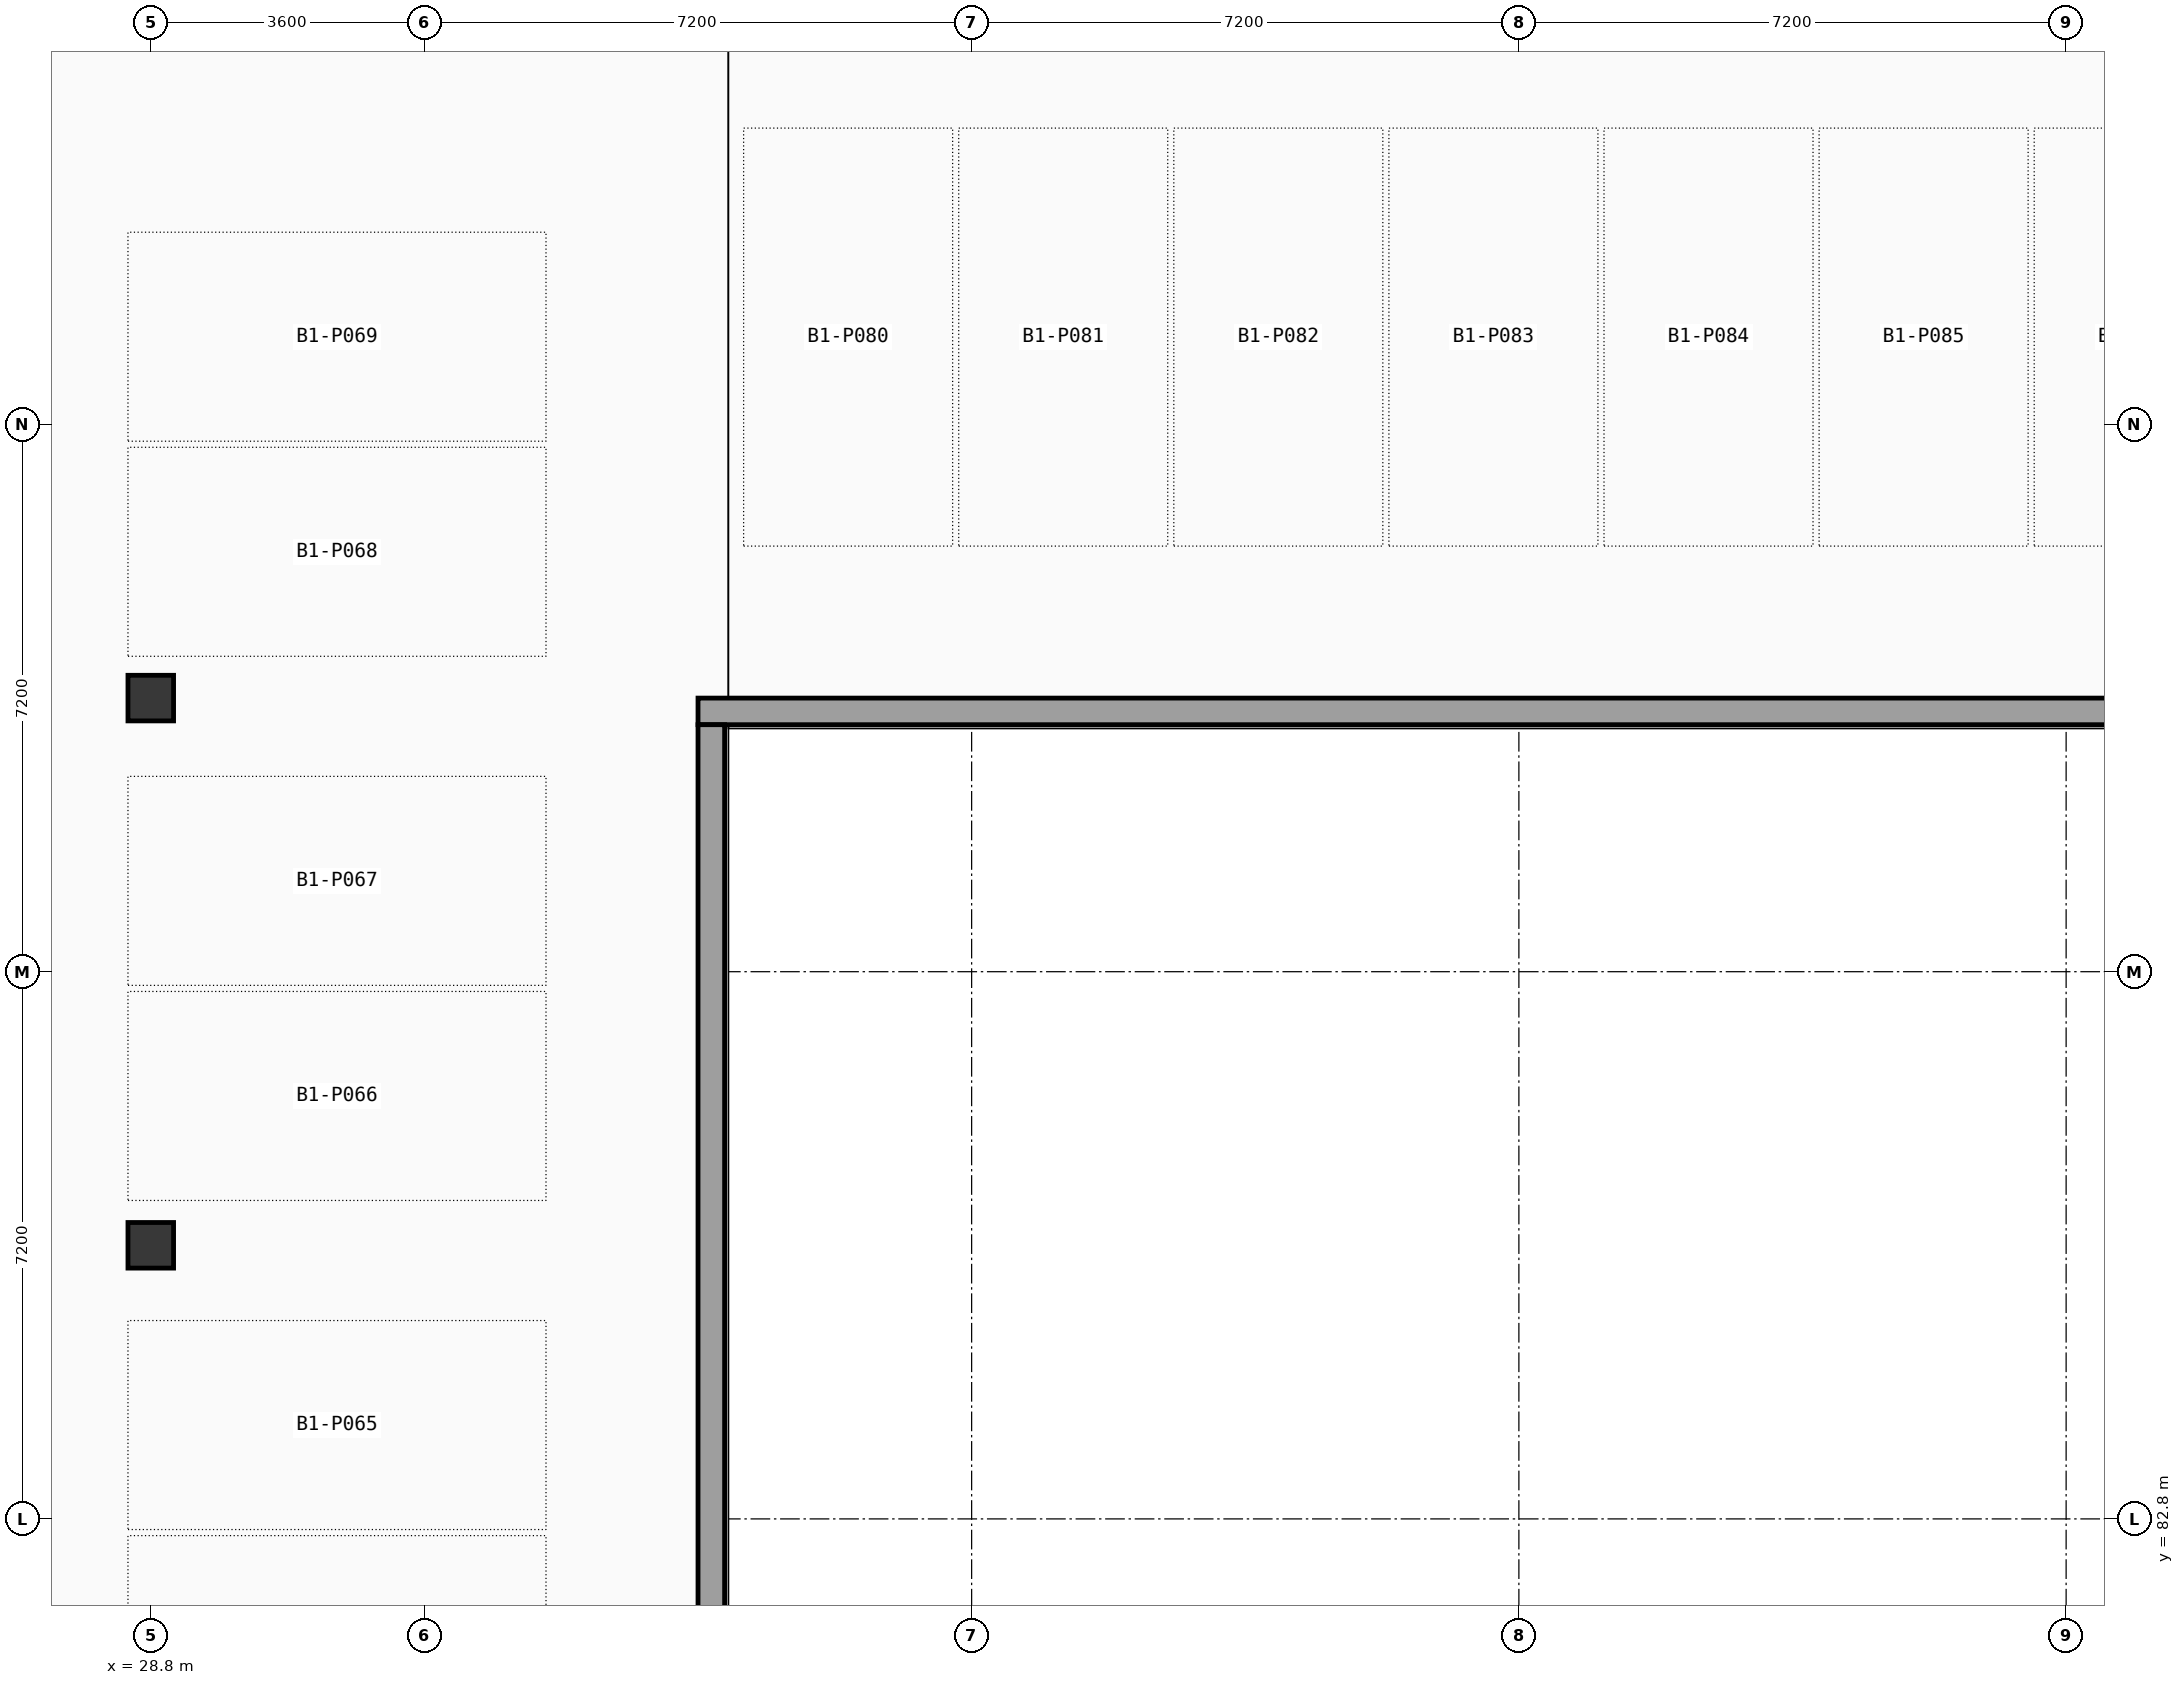
"""IFC4 building model, lengths in metres.
Left out: names, types, materials, properties, quantities, classifications, styles, units other than length and angle.
Written with IfcOpenShell. Run it as: python <this file> out.ifc"""

import sys

from ifc_helpers import new_model, si_unit, direction, frame, frame_2d, origin, origin_2d, place, context, subcontext, project, spatial, rectangle, extrude, element, save


model = new_model("IFC4")
c1 = context("Model", 3, precision=1e-05, world=origin(), true_north=direction((0.0, 1.0)))
c2 = subcontext(c1, "Body", "Model", "MODEL_VIEW")
j1 = project(units=[si_unit("LENGTHUNIT", "METRE"), si_unit("PLANEANGLEUNIT", "RADIAN")], contexts=[c1])
p1 = place(None, origin())
s1 = spatial("IfcSite", under=j1, at=p1, CompositionType="ELEMENT")
p2 = place(p1, origin())
s2 = spatial("IfcBuilding", under=s1, at=p2, CompositionType="ELEMENT")
p3 = place(p2, frame((0.0, 0.0, -4.2)))
s3 = spatial("IfcBuildingStorey", under=s2, at=p3, CompositionType="ELEMENT", Elevation=-4.2)
for number, where, z_axis, x_axis in (
    (1, (28.8, 86.4, 0.0), (0.0, 0.0, 1.0), (1.0, 0.0, 0.0)),
    (2, (28.8, 93.6, 0.0), (0.0, 0.0, 1.0), (1.0, 0.0, 0.0)),
):
    element("IfcColumn", number, at=place(p3, frame(where, z_axis=z_axis, x_axis=x_axis)), inside=s3, PredefinedType="COLUMN", context=c2, shape_type="SweptSolid", body=[
        extrude(rectangle(XDim=0.6, YDim=0.6, at=origin_2d()), origin(), (0.0, 0.0, 1.0), 4.2),
    ])
p4 = place(p3, frame((36.0, 93.425, 0.0), z_axis=(0.0, 0.0, 1.0), x_axis=(1.0, 0.0, 0.0)))
e3 = element("IfcWall", 3, at=p4, inside=s3, PredefinedType="SOLIDWALL", context=c2, shape_type="SweptSolid", body=[
    extrude(rectangle(XDim=100.8, YDim=0.35, at=frame_2d((50.4, 0.0))), origin(), (0.0, 0.0, 1.0), 3.92),
])
p5 = place(p3, frame((36.175, 61.55, 0.0), z_axis=(0.0, 0.0, 1.0), x_axis=(0.0, 1.0, 0.0)))
e4 = element("IfcWall", 4, at=p5, inside=s3, PredefinedType="SOLIDWALL", context=c2, shape_type="SweptSolid", body=[
    extrude(rectangle(XDim=31.7, YDim=0.35, at=frame_2d((15.85, 0.0))), origin(), (0.0, 0.0, 1.0), 3.92),
])
save(model, sys.argv[1])
